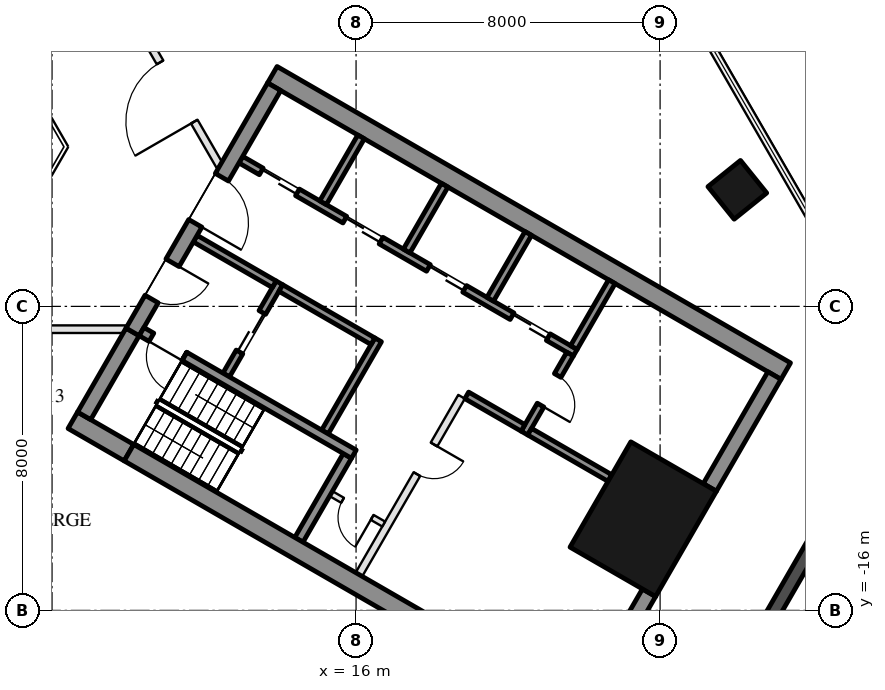
"""IFC4 building model, lengths in metres.
Left out: names, types, materials, properties, quantities, classifications, styles, units other than length and angle.
Written with IfcOpenShell. Run it as: python <this file> out.ifc"""

import sys

from ifc_helpers import new_model, si_unit, direction, frame, frame_2d, origin, origin_2d, place, context, subcontext, project, spatial, rectangle, hollow_rectangle, extrude, boolean, halfspace, element, fill, save


model = new_model("IFC4")
c1 = context("Model", 3, precision=1e-05, world=origin(), true_north=direction((0.0, 1.0)))
c2 = subcontext(c1, "Body", "Model", "MODEL_VIEW")
j1 = project(units=[si_unit("LENGTHUNIT", "METRE"), si_unit("PLANEANGLEUNIT", "RADIAN")], contexts=[c1])
p1 = place(None, origin())
s1 = spatial("IfcSite", under=j1, at=p1, CompositionType="ELEMENT")
p2 = place(p1, origin())
s2 = spatial("IfcBuilding", under=s1, at=p2, CompositionType="ELEMENT")
p3 = place(p2, frame((0.0, 0.0, 9.0)))
s3 = spatial("IfcBuildingStorey", under=s2, at=p3, CompositionType="ELEMENT", Elevation=9.0)
p4 = place(p3, frame((26.032, -4.932, 0.0), z_axis=(-0.144210024077, 0.022406246977, 0.989293398872), x_axis=(0.493357756794, -0.864999630049, 0.091508271899)))
e1 = element("IfcColumn", 1, at=p4, inside=s3, PredefinedType="COLUMN", context=c2, shape_type="SweptSolid", body=[
    boolean("DIFFERENCE", boolean("DIFFERENCE", extrude(hollow_rectangle(XDim=1.1, YDim=1.1, WallThickness=0.05, at=origin_2d()), origin(), (0.0, 0.0, 1.0), 6.57), halfspace(frame((0.0, 0.0, 0.019), z_axis=(0.0, 0.0, 1.0), x_axis=(1.0, 0.0, 0.0)), True)), halfspace(frame((0.0, 0.0, 6.552), z_axis=(0.0, 0.0, 1.0), x_axis=(1.0, 0.0, 0.0)), False)),
])
p5 = place(p3, frame((23.556, -13.6, 0.0), z_axis=(0.0, 0.0, 1.0), x_axis=(0.5, 0.866025403784, 0.0)))
e2 = element("IfcColumn", 2, at=p5, inside=s3, PredefinedType="COLUMN", context=c2, shape_type="SweptSolid", body=[
    extrude(hollow_rectangle(XDim=3.2, YDim=2.6, WallThickness=0.08, at=origin_2d()), origin(), (0.0, 0.0, 1.0), 6.5),
])
p6 = place(p3, frame((25.648, -18.382, 0.0), z_axis=(0.0, 0.0, 1.0), x_axis=(0.499981900942, 0.866035853028, 0.0)))
e3 = element("IfcWall", 3, at=p6, inside=s3, PredefinedType="SOLIDWALL", context=c2, shape_type="SweptSolid", body=[
    extrude(rectangle(XDim=6.191, YDim=0.35, at=frame_2d((3.095, 0.0))), origin(), (0.0, 0.0, 1.0), 6.15),
])
p7 = place(p3, frame((13.797, -1.903, 0.0), z_axis=(0.0, 0.0, 1.0), x_axis=(0.866024264262, -0.500001973705, 0.0)))
e4 = element("IfcWall", 4, at=p7, inside=s3, PredefinedType="SHEAR", context=c2, shape_type="SweptSolid", body=[
    extrude(rectangle(XDim=15.6, YDim=0.5, at=frame_2d((7.8, 0.0))), origin(), (0.0, 0.0, 1.0), 6.15),
])
p8 = place(p3, frame((25.309, -12.764, 0.0), z_axis=(0.0, 0.0, 1.0), x_axis=(0.499977295307, 0.866038511948, 0.0)))
e5 = element("IfcWall", 5, at=p8, inside=s3, PredefinedType="SHEAR", context=c2, shape_type="SweptSolid", body=[
    extrude(rectangle(XDim=3.4, YDim=0.4, at=frame_2d((1.7, 0.0))), origin(), (0.0, 0.0, 1.0), 6.15),
])
p9 = place(p3, frame((22.009, -18.48, 0.0), z_axis=(0.0, 0.0, 1.0), x_axis=(0.500008388397, 0.866020560687, 0.0)))
e6 = element("IfcWall", 6, at=p9, inside=s3, PredefinedType="SHEAR", context=c2, shape_type="SweptSolid", body=[
    extrude(rectangle(XDim=3.4, YDim=0.4, at=frame_2d((1.7, 0.0))), origin(), (0.0, 0.0, 1.0), 6.15),
])
p10 = place(p3, frame((14.496, -14.143, 0.0), z_axis=(0.0, 0.0, 1.0), x_axis=(0.500062241894, 0.865989465428, 0.0)))
e7 = element("IfcWall", 7, at=p10, inside=s3, PredefinedType="SHEAR", context=c2, shape_type="SweptSolid", body=[
    extrude(rectangle(XDim=2.55, YDim=0.25, at=frame_2d((1.275, 0.0))), origin(), (0.0, 0.0, 1.0), 6.15),
])
p11 = place(p3, frame((15.181, -11.305, 0.0), z_axis=(0.0, 0.0, 1.0), x_axis=(0.49994636267, 0.866056369097, 0.0)))
e8 = element("IfcWall", 8, at=p11, inside=s3, PredefinedType="SHEAR", context=c2, shape_type="SweptSolid", body=[
    extrude(rectangle(XDim=2.8, YDim=0.2, at=frame_2d((1.4, 0.0))), origin(), (0.0, 0.0, 1.0), 6.15),
])
p12 = place(p3, frame((12.583, -9.805, 0.0), z_axis=(0.0, 0.0, 1.0), x_axis=(0.49994636267, 0.866056369097, 0.0)))
e9 = element("IfcWall", 9, at=p12, inside=s3, PredefinedType="SHEAR", context=c2, shape_type="SweptSolid", body=[
    extrude(rectangle(XDim=2.8, YDim=0.2, at=frame_2d((1.4, 0.0))), origin(), (0.0, 0.0, 1.0), 6.15),
])
p13 = place(p12, frame((0.7, 0.0, 0.0)))
e10 = element("IfcOpeningElement", 10, at=p13, cuts=e9, PredefinedType="OPENING", context=c2, shape_type="SweptSolid", body=[
    extrude(rectangle(XDim=1.2, YDim=2.1, at=frame_2d((0.6, 1.05))), frame((0.0, 0.11, 0.0), z_axis=(0.0, -1.0, 0.0), x_axis=(1.0, 0.0, 0.0)), (0.0, 0.0, 1.0), 0.22),
])
p14 = place(p3, frame((11.768, -6.217, 0.0), z_axis=(0.0, 0.0, 1.0), x_axis=(0.866050077142, -0.499957262057, 0.0)))
e11 = element("IfcWall", 11, at=p14, inside=s3, PredefinedType="SHEAR", context=c2, shape_type="SweptSolid", body=[
    extrude(rectangle(XDim=2.4, YDim=0.2, at=frame_2d((1.2, 0.0))), origin(), (0.0, 0.0, 1.0), 6.15),
])
p15 = place(p3, frame((14.02, -7.517, 0.0), z_axis=(0.0, 0.0, 1.0), x_axis=(0.866034573852, -0.49998411664, 0.0)))
e12 = element("IfcWall", 12, at=p15, inside=s3, PredefinedType="SHEAR", context=c2, shape_type="SweptSolid", body=[
    extrude(rectangle(XDim=2.8, YDim=0.2, at=frame_2d((1.4, 0.0))), origin(), (0.0, 0.0, 1.0), 6.15),
])
p16 = place(p3, frame((12.968, -4.138, 0.0), z_axis=(0.0, 0.0, 1.0), x_axis=(0.866028328073, -0.49999493495, 0.0)))
e13 = element("IfcWall", 13, at=p16, inside=s3, PredefinedType="SHEAR", context=c2, shape_type="SweptSolid", body=[
    extrude(rectangle(XDim=10.16, YDim=0.2, at=frame_2d((5.08, 0.0))), origin(), (0.0, 0.0, 1.0), 6.15),
])
p17 = place(p16, frame((0.62, 0.0, 0.0)))
e14 = element("IfcOpeningElement", 14, at=p17, cuts=e13, PredefinedType="OPENING", context=c2, shape_type="SweptSolid", body=[
    extrude(rectangle(XDim=1.1, YDim=2.1, at=frame_2d((0.55, 1.05))), frame((0.0, 0.11, 0.0), z_axis=(0.0, -1.0, 0.0), x_axis=(1.0, 0.0, 0.0)), (0.0, 0.0, 1.0), 0.22),
])
p18 = place(p16, frame((3.16, 0.0, 0.0)))
e15 = element("IfcOpeningElement", 15, at=p18, cuts=e13, PredefinedType="OPENING", context=c2, shape_type="SweptSolid", body=[
    extrude(rectangle(XDim=1.1, YDim=2.1, at=frame_2d((0.55, 1.05))), frame((0.0, 0.11, 0.0), z_axis=(0.0, -1.0, 0.0), x_axis=(1.0, 0.0, 0.0)), (0.0, 0.0, 1.0), 0.22),
])
p19 = place(p16, frame((5.7, 0.0, 0.0)))
e16 = element("IfcOpeningElement", 16, at=p19, cuts=e13, PredefinedType="OPENING", context=c2, shape_type="SweptSolid", body=[
    extrude(rectangle(XDim=1.1, YDim=2.1, at=frame_2d((0.55, 1.05))), frame((0.0, 0.11, 0.0), z_axis=(0.0, -1.0, 0.0), x_axis=(1.0, 0.0, 0.0)), (0.0, 0.0, 1.0), 0.22),
])
p20 = place(p16, frame((8.24, 0.0, 0.0)))
e17 = element("IfcOpeningElement", 17, at=p20, cuts=e13, PredefinedType="OPENING", context=c2, shape_type="SweptSolid", body=[
    extrude(rectangle(XDim=1.1, YDim=2.1, at=frame_2d((0.55, 1.05))), frame((0.0, 0.11, 0.0), z_axis=(0.0, -1.0, 0.0), x_axis=(1.0, 0.0, 0.0)), (0.0, 0.0, 1.0), 0.22),
])
p21 = place(p3, frame((20.43, -11.333, 0.0), z_axis=(0.0, 0.0, 1.0), x_axis=(0.500001309137, 0.866024647952, 0.0)))
e18 = element("IfcWall", 18, at=p21, inside=s3, PredefinedType="SHEAR", context=c2, shape_type="SweptSolid", body=[
    extrude(rectangle(XDim=2.4, YDim=0.2, at=frame_2d((1.2, 0.0))), origin(), (0.0, 0.0, 1.0), 6.15),
])
p22 = place(p21, frame((0.85, 0.0, 0.0)))
e19 = element("IfcOpeningElement", 19, at=p22, cuts=e18, PredefinedType="OPENING", context=c2, shape_type="SweptSolid", body=[
    extrude(rectangle(XDim=0.9, YDim=2.1, at=frame_2d((0.45, 1.05))), frame((0.0, 0.11, 0.0), z_axis=(0.0, -1.0, 0.0), x_axis=(1.0, 0.0, 0.0)), (0.0, 0.0, 1.0), 0.22),
])
p23 = place(p3, frame((18.913, -10.342, 0.0), z_axis=(0.0, 0.0, 1.0), x_axis=(0.866038183914, -0.499977863513, 0.0)))
e20 = element("IfcWall", 20, at=p23, inside=s3, PredefinedType="SHEAR", context=c2, shape_type="SweptSolid", body=[
    extrude(rectangle(XDim=1.71, YDim=0.2, at=frame_2d((0.855, 0.0))), origin(), (0.0, 0.0, 1.0), 6.15),
])
for number, where, z_axis, x_axis in (
    (21, (15.131, -5.272, 0.0), (0.0, 0.0, 1.0), (0.5, 0.866, 0.0)),
    (22, (17.331, -6.542, 0.0), (0.0, 0.0, 1.0), (0.5, 0.866, 0.0)),
    (23, (19.531, -7.812, 0.0), (0.0, 0.0, 1.0), (0.5, 0.866, 0.0)),
    (24, (21.73, -9.082, 0.0), (0.0, 0.0, 1.0), (0.5, 0.866, 0.0)),
):
    element("IfcWall", number, at=place(p3, frame(where, z_axis=z_axis, x_axis=x_axis)), inside=s3, PredefinedType="SHEAR", context=c2, shape_type="SweptSolid", body=[
        extrude(rectangle(XDim=2.0, YDim=0.2, at=frame_2d((1.0, 0.0))), origin(), (0.0, 0.0, 1.0), 6.15),
    ])
p24 = place(p3, frame((20.567, -11.297, 0.0), z_axis=(0.0, 0.0, 1.0), x_axis=(0.866048967903, -0.499959183527, 0.0)))
e25 = element("IfcWall", 25, at=p24, inside=s3, PredefinedType="SHEAR", context=c2, shape_type="SweptSolid", body=[
    extrude(rectangle(XDim=2.44, YDim=0.2, at=frame_2d((1.22, 0.0))), origin(), (0.0, 0.0, 1.0), 6.15),
])
p25 = place(p3, frame((16.076, -15.055, 0.0), z_axis=(0.0, 0.0, 1.0), x_axis=(0.499995103361, 0.866028230842, 0.0)))
e26 = element("IfcWall", 26, at=p25, inside=s3, PredefinedType="PARTITIONING", context=c2, shape_type="SweptSolid", body=[
    extrude(rectangle(XDim=5.4, YDim=0.2, at=frame_2d((2.7, 0.0))), origin(), (0.0, 0.0, 1.0), 6.15),
])
p26 = place(p25, frame((3.05, 0.0, 0.0)))
e27 = element("IfcOpeningElement", 27, at=p26, cuts=e26, PredefinedType="OPENING", context=c2, shape_type="SweptSolid", body=[
    extrude(rectangle(XDim=0.9, YDim=2.1, at=frame_2d((0.45, 1.05))), frame((0.0, 0.11, 0.0), z_axis=(0.0, -1.0, 0.0), x_axis=(1.0, 0.0, 0.0)), (0.0, 0.0, 1.0), 0.22),
])
p27 = place(p3, frame((15.342, -12.928, 0.0), z_axis=(0.0, 0.0, 1.0), x_axis=(0.865989903783, -0.500061482766, 0.0)))
e28 = element("IfcWall", 28, at=p27, inside=s3, PredefinedType="PARTITIONING", context=c2, shape_type="SweptSolid", body=[
    extrude(rectangle(XDim=1.6, YDim=0.15, at=frame_2d((0.8, 0.0))), origin(), (0.0, 0.0, 1.0), 6.15),
])
p28 = place(p27, frame((0.35, 0.0, 0.0)))
e29 = element("IfcOpeningElement", 29, at=p28, cuts=e28, PredefinedType="OPENING", context=c2, shape_type="SweptSolid", body=[
    extrude(rectangle(XDim=0.9, YDim=2.1, at=frame_2d((0.45, 1.05))), frame((0.0, 0.085, 0.0), z_axis=(0.0, -1.0, 0.0), x_axis=(1.0, 0.0, 0.0)), (0.0, 0.0, 1.0), 0.17),
])
p29 = place(p3, frame((8.547, -10.997, 0.0), z_axis=(0.0, 0.0, 1.0), x_axis=(0.866033076574, -0.499986710104, 0.0)))
e30 = element("IfcWall", 30, at=p29, inside=s3, PredefinedType="SHEAR", context=c2, shape_type="SweptSolid", body=[
    extrude(rectangle(XDim=1.706, YDim=0.5, at=frame_2d((0.853, 0.0))), origin(), (0.0, 0.0, 1.0), 6.15),
])
p30 = place(p3, frame((10.024, -11.85, 0.0), z_axis=(0.0, 0.0, 1.0), x_axis=(0.86602318214, -0.500003847982, 0.0)))
e31 = element("IfcWall", 31, at=p30, inside=s3, PredefinedType="SHEAR", context=c2, shape_type="SweptSolid", body=[
    extrude(rectangle(XDim=13.894, YDim=0.5, at=frame_2d((6.947, 0.0))), origin(), (0.0, 0.0, 1.0), 6.15),
])
p31 = place(p3, frame((8.845, -10.88, 0.0), z_axis=(0.0, 0.0, 1.0), x_axis=(0.499990435942, 0.866030925526, 0.0)))
e32 = element("IfcWall", 32, at=p31, inside=s3, PredefinedType="SHEAR", context=c2, shape_type="SweptSolid", body=[
    extrude(rectangle(XDim=2.55, YDim=0.4, at=frame_2d((1.275, 0.0))), origin(), (0.0, 0.0, 1.0), 6.15),
])
p32 = place(p3, frame((10.12, -8.672, 0.0), z_axis=(0.0, 0.0, 1.0), x_axis=(0.500008956979, 0.866020232408, 0.0)))
e33 = element("IfcWall", 33, at=p32, inside=s3, PredefinedType="SHEAR", context=c2, shape_type="SweptSolid", body=[
    extrude(rectangle(XDim=7.45, YDim=0.4, at=frame_2d((3.725, 0.0))), origin(), (0.0, 0.0, 1.0), 6.15),
])
p33 = place(p32, frame((1.0, 0.0, 0.0)))
e34 = element("IfcOpeningElement", 34, at=p33, cuts=e33, PredefinedType="OPENING", context=c2, shape_type="SweptSolid", body=[
    extrude(rectangle(XDim=1.1, YDim=2.1, at=frame_2d((0.55, 1.05))), frame((0.0, 0.21, 0.0), z_axis=(0.0, -1.0, 0.0), x_axis=(1.0, 0.0, 0.0)), (0.0, 0.0, 1.0), 0.42),
])
p34 = place(p32, frame((3.3, 0.0, 0.0)))
e35 = element("IfcOpeningElement", 35, at=p34, cuts=e33, PredefinedType="OPENING", context=c2, shape_type="SweptSolid", body=[
    extrude(rectangle(XDim=1.4, YDim=2.1, at=frame_2d((0.7, 1.05))), frame((0.0, 0.21, 0.0), z_axis=(0.0, -1.0, 0.0), x_axis=(1.0, 0.0, 0.0)), (0.0, 0.0, 1.0), 0.42),
])
p35 = place(p3, frame((10.356, -8.664, 0.0), z_axis=(0.0, 0.0, 1.0), x_axis=(0.866095317631, -0.499878886109, 0.0)))
e36 = element("IfcWall", 36, at=p35, inside=s3, PredefinedType="SHEAR", context=c2, shape_type="SweptSolid", body=[
    extrude(rectangle(XDim=1.306, YDim=0.25, at=frame_2d((0.653, 0.0))), origin(), (0.0, 0.0, 1.0), 6.15),
])
p36 = place(p35, frame((0.3, 0.0, 0.0)))
e37 = element("IfcOpeningElement", 37, at=p36, cuts=e36, PredefinedType="OPENING", context=c2, shape_type="SweptSolid", body=[
    extrude(rectangle(XDim=1.0, YDim=2.1, at=frame_2d((0.5, 1.05))), frame((0.0, 0.135, 0.0), z_axis=(0.0, -1.0, 0.0), x_axis=(1.0, 0.0, 0.0)), (0.0, 0.0, 1.0), 0.27),
])
p37 = place(p3, frame((11.487, -9.316, 0.0), z_axis=(0.0, 0.0, 1.0), x_axis=(0.866011695431, -0.500023742813, 0.0)))
e38 = element("IfcWall", 38, at=p37, inside=s3, PredefinedType="SHEAR", context=c2, shape_type="SweptSolid", body=[
    extrude(rectangle(XDim=5.144, YDim=0.25, at=frame_2d((2.572, 0.0))), origin(), (0.0, 0.0, 1.0), 6.15),
])
p38 = place(p3, frame((-9.93, -8.6, 0.0), z_axis=(0.0, 0.0, 1.0), x_axis=(1.0, 0.0, 0.0)))
e39 = element("IfcWall", 39, at=p38, inside=s3, PredefinedType="PARTITIONING", context=c2, shape_type="SweptSolid", body=[
    extrude(rectangle(XDim=19.861, YDim=0.2, at=frame_2d((9.93, 0.0))), origin(), (0.0, 0.0, 1.0), 5.36),
])
p39 = place(p38, frame((1.234, 0.0, 0.0)))
e40 = element("IfcOpeningElement", 40, at=p39, cuts=e39, PredefinedType="OPENING", context=c2, shape_type="SweptSolid", body=[
    extrude(rectangle(XDim=1.2, YDim=2.1, at=frame_2d((0.6, 1.05))), frame((0.0, 0.11, 0.0), z_axis=(0.0, -1.0, 0.0), x_axis=(1.0, 0.0, 0.0)), (0.0, 0.0, 1.0), 0.22),
])
p40 = place(p38, frame((5.537, 0.0, 0.0)))
e41 = element("IfcOpeningElement", 41, at=p40, cuts=e39, PredefinedType="OPENING", context=c2, shape_type="SweptSolid", body=[
    extrude(rectangle(XDim=1.8, YDim=2.4, at=frame_2d((0.9, 1.2))), frame((0.0, 0.11, 0.0), z_axis=(0.0, -1.0, 0.0), x_axis=(1.0, 0.0, 0.0)), (0.0, 0.0, 1.0), 0.22),
])
p41 = place(p38, frame((11.224, 0.0, 0.0)))
e42 = element("IfcOpeningElement", 42, at=p41, cuts=e39, PredefinedType="OPENING", context=c2, shape_type="SweptSolid", body=[
    extrude(rectangle(XDim=1.8, YDim=2.4, at=frame_2d((0.9, 1.2))), frame((0.0, 0.11, 0.0), z_axis=(0.0, -1.0, 0.0), x_axis=(1.0, 0.0, 0.0)), (0.0, 0.0, 1.0), 0.22),
])
p42 = place(p38, frame((16.877, 0.0, 0.0)))
e43 = element("IfcOpeningElement", 43, at=p42, cuts=e39, PredefinedType="OPENING", context=c2, shape_type="SweptSolid", body=[
    extrude(rectangle(XDim=1.0, YDim=2.1, at=frame_2d((0.5, 1.05))), frame((0.0, 0.11, 0.0), z_axis=(0.0, -1.0, 0.0), x_axis=(1.0, 0.0, 0.0)), (0.0, 0.0, 1.0), 0.22),
])
p43 = place(p3, frame((12.413, -4.3, 0.0), z_axis=(0.0, 0.0, 1.0), x_axis=(-0.50000478328, 0.866022642139, 0.0)))
e44 = element("IfcWall", 44, at=p43, inside=s3, PredefinedType="PARTITIONING", context=c2, shape_type="SweptSolid", body=[
    extrude(rectangle(XDim=19.861, YDim=0.2, at=frame_2d((9.931, 0.0))), origin(), (0.0, 0.0, 1.0), 5.36),
])
p44 = place(p43, frame((1.342, 0.0, 0.0)))
e45 = element("IfcOpeningElement", 45, at=p44, cuts=e44, PredefinedType="OPENING", context=c2, shape_type="SweptSolid", body=[
    extrude(rectangle(XDim=1.8, YDim=2.4, at=frame_2d((0.9, 1.2))), frame((0.0, 0.11, 0.0), z_axis=(0.0, -1.0, 0.0), x_axis=(1.0, 0.0, 0.0)), (0.0, 0.0, 1.0), 0.22),
])
p45 = place(p43, frame((5.825, 0.0, 0.0)))
e46 = element("IfcOpeningElement", 46, at=p45, cuts=e44, PredefinedType="OPENING", context=c2, shape_type="SweptSolid", body=[
    extrude(rectangle(XDim=1.8, YDim=2.4, at=frame_2d((0.9, 1.2))), frame((0.0, 0.11, 0.0), z_axis=(0.0, -1.0, 0.0), x_axis=(1.0, 0.0, 0.0)), (0.0, 0.0, 1.0), 0.22),
])
p46 = place(p43, frame((9.818, 0.0, 0.0)))
e47 = element("IfcOpeningElement", 47, at=p46, cuts=e44, PredefinedType="OPENING", context=c2, shape_type="SweptSolid", body=[
    extrude(rectangle(XDim=1.2, YDim=2.1, at=frame_2d((0.6, 1.05))), frame((0.0, 0.11, 0.0), z_axis=(0.0, -1.0, 0.0), x_axis=(1.0, 0.0, 0.0)), (0.0, 0.0, 1.0), 0.22),
])
p47 = place(p43, frame((17.49, 0.0, 0.0)))
e48 = element("IfcOpeningElement", 48, at=p47, cuts=e44, PredefinedType="OPENING", context=c2, shape_type="SweptSolid", body=[
    extrude(rectangle(XDim=1.2, YDim=2.1, at=frame_2d((0.6, 1.05))), frame((0.0, 0.11, 0.0), z_axis=(0.0, -1.0, 0.0), x_axis=(1.0, 0.0, 0.0)), (0.0, 0.0, 1.0), 0.22),
])
p48 = place(p43, frame((13.23, 0.0, 0.0)))
e49 = element("IfcOpeningElement", 49, at=p48, cuts=e44, PredefinedType="OPENING", context=c2, shape_type="SweptSolid", body=[
    extrude(rectangle(XDim=1.8, YDim=2.1, at=frame_2d((0.9, 1.05))), frame((0.0, 0.11, 0.0), z_axis=(0.0, -1.0, 0.0), x_axis=(1.0, 0.0, 0.0)), (0.0, 0.0, 1.0), 0.22),
])
p49 = place(p13, origin())
e50 = element("IfcDoor", 50, at=p49, inside=s3, OperationType="DOUBLE_DOOR_SLIDING", PredefinedType="DOOR", context=c2, shape_type="SweptSolid", body=[
    extrude(rectangle(XDim=1.2, YDim=2.1, at=frame_2d((0.6, 1.05))), frame((0.0, 0.025, 0.0), z_axis=(0.0, -1.0, 0.0), x_axis=(1.0, 0.0, 0.0)), (0.0, 0.0, 1.0), 0.05),
])
fill(e10, e50)
p50 = place(p28, frame((0.9, 0.0, 0.0), z_axis=(0.0, 0.0, 1.0), x_axis=(-1.0, 0.0, 0.0)))
e51 = element("IfcDoor", 51, at=p50, inside=s3, OperationType="SINGLE_SWING_LEFT", PredefinedType="DOOR", context=c2, shape_type="SweptSolid", body=[
    extrude(rectangle(XDim=0.9, YDim=2.1, at=frame_2d((0.45, 1.05))), frame((0.0, 0.025, 0.0), z_axis=(0.0, -1.0, 0.0), x_axis=(1.0, 0.0, 0.0)), (0.0, 0.0, 1.0), 0.05),
])
fill(e29, e51)
p51 = place(p17, origin())
e52 = element("IfcDoor", 52, at=p51, inside=s3, OperationType="DOUBLE_DOOR_SLIDING", PredefinedType="DOOR", context=c2, shape_type="SweptSolid", body=[
    extrude(rectangle(XDim=1.1, YDim=2.1, at=frame_2d((0.55, 1.05))), frame((0.0, 0.025, 0.0), z_axis=(0.0, -1.0, 0.0), x_axis=(1.0, 0.0, 0.0)), (0.0, 0.0, 1.0), 0.05),
])
fill(e14, e52)
p52 = place(p18, origin())
e53 = element("IfcDoor", 53, at=p52, inside=s3, OperationType="DOUBLE_DOOR_SLIDING", PredefinedType="DOOR", context=c2, shape_type="SweptSolid", body=[
    extrude(rectangle(XDim=1.1, YDim=2.1, at=frame_2d((0.55, 1.05))), frame((0.0, 0.025, 0.0), z_axis=(0.0, -1.0, 0.0), x_axis=(1.0, 0.0, 0.0)), (0.0, 0.0, 1.0), 0.05),
])
fill(e15, e53)
p53 = place(p19, origin())
e54 = element("IfcDoor", 54, at=p53, inside=s3, OperationType="DOUBLE_DOOR_SLIDING", PredefinedType="DOOR", context=c2, shape_type="SweptSolid", body=[
    extrude(rectangle(XDim=1.1, YDim=2.1, at=frame_2d((0.55, 1.05))), frame((0.0, 0.025, 0.0), z_axis=(0.0, -1.0, 0.0), x_axis=(1.0, 0.0, 0.0)), (0.0, 0.0, 1.0), 0.05),
])
fill(e16, e54)
p54 = place(p20, origin())
e55 = element("IfcDoor", 55, at=p54, inside=s3, OperationType="DOUBLE_DOOR_SLIDING", PredefinedType="DOOR", context=c2, shape_type="SweptSolid", body=[
    extrude(rectangle(XDim=1.1, YDim=2.1, at=frame_2d((0.55, 1.05))), frame((0.0, 0.025, 0.0), z_axis=(0.0, -1.0, 0.0), x_axis=(1.0, 0.0, 0.0)), (0.0, 0.0, 1.0), 0.05),
])
fill(e17, e55)
p55 = place(p22, frame((0.9, 0.0, 0.0), z_axis=(0.0, 0.0, 1.0), x_axis=(-1.0, 0.0, 0.0)))
e56 = element("IfcDoor", 56, at=p55, inside=s3, OperationType="SINGLE_SWING_RIGHT", PredefinedType="DOOR", context=c2, shape_type="SweptSolid", body=[
    extrude(rectangle(XDim=0.9, YDim=2.1, at=frame_2d((0.45, 1.05))), frame((0.0, 0.025, 0.0), z_axis=(0.0, -1.0, 0.0), x_axis=(1.0, 0.0, 0.0)), (0.0, 0.0, 1.0), 0.05),
])
fill(e19, e56)
p56 = place(p26, frame((0.9, 0.0, 0.0), z_axis=(0.0, 0.0, 1.0), x_axis=(-1.0, 0.0, 0.0)))
e57 = element("IfcDoor", 57, at=p56, inside=s3, OperationType="SINGLE_SWING_LEFT", PredefinedType="DOOR", context=c2, shape_type="SweptSolid", body=[
    extrude(rectangle(XDim=0.9, YDim=2.1, at=frame_2d((0.45, 1.05))), frame((0.0, 0.025, 0.0), z_axis=(0.0, -1.0, 0.0), x_axis=(1.0, 0.0, 0.0)), (0.0, 0.0, 1.0), 0.05),
])
fill(e27, e57)
p57 = place(p33, frame((1.1, 0.0, 0.0), z_axis=(0.0, 0.0, 1.0), x_axis=(-1.0, 0.0, 0.0)))
e58 = element("IfcDoor", 58, at=p57, inside=s3, OperationType="SINGLE_SWING_LEFT", PredefinedType="DOOR", context=c2, shape_type="SweptSolid", body=[
    extrude(rectangle(XDim=1.1, YDim=2.1, at=frame_2d((0.55, 1.05))), frame((0.0, 0.025, 0.0), z_axis=(0.0, -1.0, 0.0), x_axis=(1.0, 0.0, 0.0)), (0.0, 0.0, 1.0), 0.05),
])
fill(e34, e58)
p58 = place(p34, frame((1.4, 0.0, 0.0), z_axis=(0.0, 0.0, 1.0), x_axis=(-1.0, 0.0, 0.0)))
e59 = element("IfcDoor", 59, at=p58, inside=s3, OperationType="DOUBLE_DOOR_SINGLE_SWING", PredefinedType="DOOR", context=c2, shape_type="SweptSolid", body=[
    extrude(rectangle(XDim=1.4, YDim=2.1, at=frame_2d((0.7, 1.05))), frame((0.0, 0.025, 0.0), z_axis=(0.0, -1.0, 0.0), x_axis=(1.0, 0.0, 0.0)), (0.0, 0.0, 1.0), 0.05),
])
fill(e35, e59)
p59 = place(p36, frame((1.0, 0.0, 0.0), z_axis=(0.0, 0.0, 1.0), x_axis=(-1.0, 0.0, 0.0)))
e60 = element("IfcDoor", 60, at=p59, inside=s3, OperationType="SINGLE_SWING_LEFT", PredefinedType="DOOR", context=c2, shape_type="SweptSolid", body=[
    extrude(rectangle(XDim=1.0, YDim=2.1, at=frame_2d((0.5, 1.05))), frame((0.0, 0.025, 0.0), z_axis=(0.0, -1.0, 0.0), x_axis=(1.0, 0.0, 0.0)), (0.0, 0.0, 1.0), 0.05),
])
fill(e37, e60)
p60 = place(p44, origin())
e61 = element("IfcDoor", 61, at=p60, inside=s3, OperationType="DOUBLE_DOOR_SINGLE_SWING", PredefinedType="DOOR", context=c2, shape_type="SweptSolid", body=[
    extrude(rectangle(XDim=1.8, YDim=2.4, at=frame_2d((0.9, 1.2))), frame((0.0, 0.025, 0.0), z_axis=(0.0, -1.0, 0.0), x_axis=(1.0, 0.0, 0.0)), (0.0, 0.0, 1.0), 0.05),
])
fill(e45, e61)
save(model, sys.argv[1])
